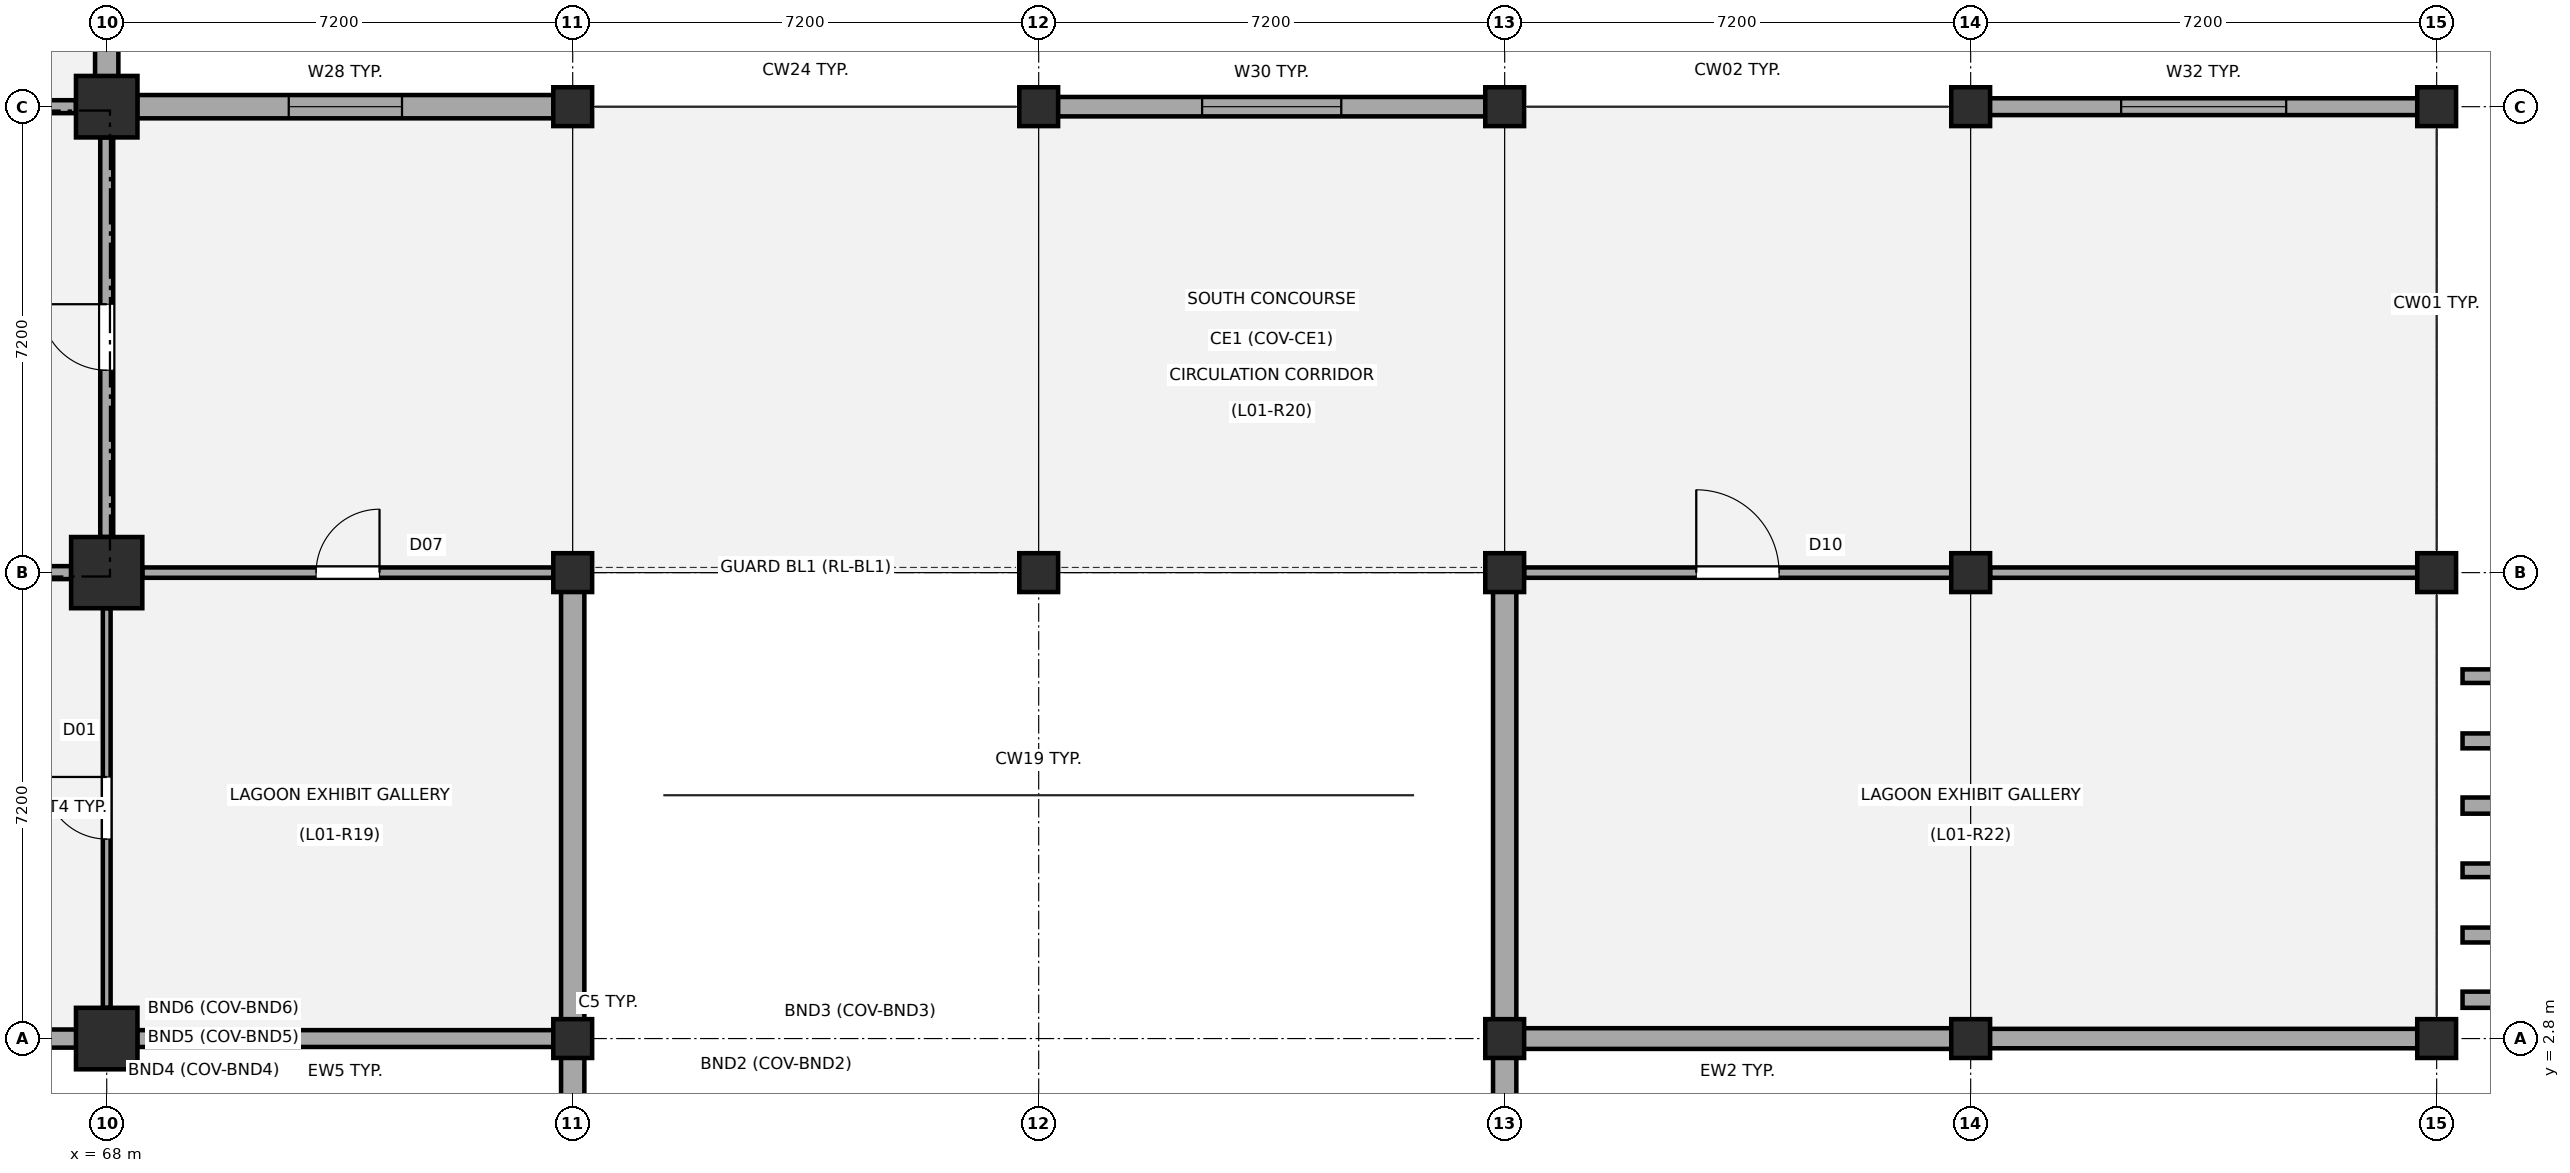
"""IFC4 building model, lengths in metres.
Left out: names, types, materials, properties, quantities, classifications, styles, units other than length and angle.
Written with IfcOpenShell. Run it as: python <this file> out.ifc"""

import sys

from ifc_helpers import new_model, si_unit, direction, frame, frame_2d, origin, origin_2d, place, context, subcontext, project, spatial, polyline, rectangle, outline, extrude, element, fill, save


model = new_model("IFC4")
c1 = context("Model", 3, precision=1e-05, world=origin(), true_north=direction((0.0, 1.0)))
c2 = subcontext(c1, "Body", "Model", "MODEL_VIEW")
j1 = project(units=[si_unit("LENGTHUNIT", "METRE"), si_unit("PLANEANGLEUNIT", "RADIAN")], contexts=[c1])
p1 = place(None, origin())
s1 = spatial("IfcSite", under=j1, at=p1, CompositionType="ELEMENT")
p2 = place(p1, origin())
s2 = spatial("IfcBuilding", under=s1, at=p2, CompositionType="ELEMENT")
p3 = place(p2, frame((0.0, 0.0, 4.68)))
s3 = spatial("IfcBuildingStorey", under=s2, at=p3, CompositionType="ELEMENT", Elevation=4.68)
p4 = place(p3, frame((68.0, 2.8, 0.0), z_axis=(0.0, 0.0, 1.0), x_axis=(1.0, 0.0, 0.0)))
e1 = element("IfcColumn", 1, at=p4, inside=s3, PredefinedType="COLUMN", context=c2, shape_type="SweptSolid", body=[
    extrude(rectangle(XDim=0.95, YDim=0.95, at=origin_2d()), origin(), (0.0, 0.0, 1.0), 4.5),
])
p5 = place(p3, frame((68.0, 10.0, 0.0), z_axis=(0.0, 0.0, 1.0), x_axis=(1.0, 0.0, 0.0)))
e2 = element("IfcColumn", 2, at=p5, inside=s3, PredefinedType="COLUMN", context=c2, shape_type="SweptSolid", body=[
    extrude(rectangle(XDim=1.1, YDim=1.1, at=origin_2d()), origin(), (0.0, 0.0, 1.0), 4.5),
])
p6 = place(p3, frame((68.0, 17.2, 0.0), z_axis=(0.0, 0.0, 1.0), x_axis=(1.0, 0.0, 0.0)))
e3 = element("IfcColumn", 3, at=p6, inside=s3, PredefinedType="COLUMN", context=c2, shape_type="SweptSolid", body=[
    extrude(rectangle(XDim=0.95, YDim=0.95, at=origin_2d()), origin(), (0.0, 0.0, 1.0), 4.5),
])
for number, where, z_axis, x_axis in (
    (4, (75.2, 2.8, 0.0), (0.0, 0.0, 1.0), (1.0, 0.0, 0.0)),
    (5, (75.2, 10.0, 0.0), (0.0, 0.0, 1.0), (1.0, 0.0, 0.0)),
    (6, (75.2, 17.2, 0.0), (0.0, 0.0, 1.0), (1.0, 0.0, 0.0)),
    (7, (82.4, 10.0, 0.0), (0.0, 0.0, 1.0), (1.0, 0.0, 0.0)),
    (8, (82.4, 17.2, 0.0), (0.0, 0.0, 1.0), (1.0, 0.0, 0.0)),
    (9, (89.6, 2.8, 0.0), (0.0, 0.0, 1.0), (1.0, 0.0, 0.0)),
    (10, (89.6, 10.0, 0.0), (0.0, 0.0, 1.0), (1.0, 0.0, 0.0)),
    (11, (89.6, 17.2, 0.0), (0.0, 0.0, 1.0), (1.0, 0.0, 0.0)),
    (12, (96.8, 2.8, 0.0), (0.0, 0.0, 1.0), (1.0, 0.0, 0.0)),
    (13, (96.8, 10.0, 0.0), (0.0, 0.0, 1.0), (1.0, 0.0, 0.0)),
    (14, (96.8, 17.2, 0.0), (0.0, 0.0, 1.0), (1.0, 0.0, 0.0)),
    (15, (104.0, 2.8, 0.0), (0.0, 0.0, 1.0), (1.0, 0.0, 0.0)),
    (16, (104.0, 10.0, 0.0), (0.0, 0.0, 1.0), (1.0, 0.0, 0.0)),
    (17, (104.0, 17.2, 0.0), (0.0, 0.0, 1.0), (1.0, 0.0, 0.0)),
):
    element("IfcColumn", number, at=place(p3, frame(where, z_axis=z_axis, x_axis=x_axis)), inside=s3, PredefinedType="COLUMN", context=c2, shape_type="SweptSolid", body=[
        extrude(rectangle(XDim=0.6, YDim=0.6, at=origin_2d()), origin(), (0.0, 0.0, 1.0), 4.5),
    ])
p7 = place(p3, frame((67.53, 2.8, 0.0), z_axis=(0.0, 0.0, 1.0), x_axis=(-1.0, 0.0, 0.0)))
e18 = element("IfcWall", 18, at=p7, inside=s3, PredefinedType="STANDARD", context=c2, shape_type="SweptSolid", body=[
    extrude(rectangle(XDim=6.185, YDim=0.28, at=frame_2d((3.093, 0.0))), origin(), (0.0, 0.0, 1.0), 3.49),
])
p8 = place(p3, frame((74.905, 2.8, 0.0), z_axis=(0.0, 0.0, 1.0), x_axis=(-1.0, 0.0, 0.0)))
e19 = element("IfcWall", 19, at=p8, inside=s3, PredefinedType="STANDARD", context=c2, shape_type="SweptSolid", body=[
    extrude(rectangle(XDim=6.435, YDim=0.26, at=frame_2d((3.218, 0.0))), origin(), (0.0, 0.0, 1.0), 3.51),
])
p9 = place(p3, frame((68.47, 17.2, 0.0), z_axis=(0.0, 0.0, 1.0), x_axis=(1.0, 0.0, 0.0)))
e20 = element("IfcWall", 20, at=p9, inside=s3, PredefinedType="STANDARD", context=c2, shape_type="SweptSolid", body=[
    extrude(rectangle(XDim=6.435, YDim=0.36, at=frame_2d((3.218, 0.0))), origin(), (0.0, 0.0, 1.0), 3.49),
])
p10 = place(p9, frame((2.343, 0.0, 0.95)))
e21 = element("IfcOpeningElement", 21, at=p10, cuts=e20, PredefinedType="OPENING", context=c2, shape_type="SweptSolid", body=[
    extrude(rectangle(XDim=1.75, YDim=1.3, at=frame_2d((0.875, 0.65))), frame((0.0, 0.19, 0.0), z_axis=(0.0, -1.0, 0.0), x_axis=(1.0, 0.0, 0.0)), (0.0, 0.0, 1.0), 0.38),
])
p11 = place(p3, frame((82.695, 17.2, 0.0), z_axis=(0.0, 0.0, 1.0), x_axis=(1.0, 0.0, 0.0)))
e22 = element("IfcWall", 22, at=p11, inside=s3, PredefinedType="STANDARD", context=c2, shape_type="SweptSolid", body=[
    extrude(rectangle(XDim=6.61, YDim=0.3, at=frame_2d((3.305, 0.0))), origin(), (0.0, 0.0, 1.0), 3.49),
])
p12 = place(p11, frame((2.23, 0.0, 0.95)))
e23 = element("IfcOpeningElement", 23, at=p12, cuts=e22, PredefinedType="OPENING", context=c2, shape_type="SweptSolid", body=[
    extrude(rectangle(XDim=2.15, YDim=1.4, at=frame_2d((1.075, 0.7))), frame((0.0, 0.16, 0.0), z_axis=(0.0, -1.0, 0.0), x_axis=(1.0, 0.0, 0.0)), (0.0, 0.0, 1.0), 0.32),
])
p13 = place(p3, frame((96.505, 2.8, 0.0), z_axis=(0.0, 0.0, 1.0), x_axis=(-1.0, 0.0, 0.0)))
e24 = element("IfcWall", 24, at=p13, inside=s3, PredefinedType="STANDARD", context=c2, shape_type="SweptSolid", body=[
    extrude(rectangle(XDim=6.61, YDim=0.32, at=frame_2d((3.305, 0.0))), origin(), (0.0, 0.0, 1.0), 3.49),
])
p14 = place(p3, frame((103.705, 2.8, 0.0), z_axis=(0.0, 0.0, 1.0), x_axis=(-1.0, 0.0, 0.0)))
e25 = element("IfcWall", 25, at=p14, inside=s3, PredefinedType="STANDARD", context=c2, shape_type="SweptSolid", body=[
    extrude(rectangle(XDim=6.61, YDim=0.3, at=frame_2d((3.305, 0.0))), origin(), (0.0, 0.0, 1.0), 3.51),
])
p15 = place(p3, frame((97.095, 17.2, 0.0), z_axis=(0.0, 0.0, 1.0), x_axis=(1.0, 0.0, 0.0)))
e26 = element("IfcWall", 26, at=p15, inside=s3, PredefinedType="STANDARD", context=c2, shape_type="SweptSolid", body=[
    extrude(rectangle(XDim=6.61, YDim=0.26, at=frame_2d((3.305, 0.0))), origin(), (0.0, 0.0, 1.0), 3.49),
])
p16 = place(p15, frame((2.03, 0.0, 0.95)))
e27 = element("IfcOpeningElement", 27, at=p16, cuts=e26, PredefinedType="OPENING", context=c2, shape_type="SweptSolid", body=[
    extrude(rectangle(XDim=2.55, YDim=1.35, at=frame_2d((1.275, 0.675))), frame((0.0, 0.14, 0.0), z_axis=(0.0, -1.0, 0.0), x_axis=(1.0, 0.0, 0.0)), (0.0, 0.0, 1.0), 0.28),
])
p17 = place(p3, frame((68.0, 23.855, 0.0), z_axis=(0.0, 0.0, 1.0), x_axis=(0.0, -1.0, 0.0)))
e28 = element("IfcWall", 28, at=p17, inside=s3, PredefinedType="STANDARD", context=c2, shape_type="SweptSolid", body=[
    extrude(rectangle(XDim=6.185, YDim=0.36, at=frame_2d((3.093, 0.0))), origin(), (0.0, 0.0, 1.0), 3.49),
])
for number, where, z_axis, x_axis in (
    (29, (75.2, 1.56, 0.0), (0.0, 0.0, 1.0), (0.0, 1.0, 0.0)),
    (30, (89.6, 1.56, 0.0), (0.0, 0.0, 1.0), (0.0, 1.0, 0.0)),
):
    element("IfcWall", number, at=place(p3, frame(where, z_axis=z_axis, x_axis=x_axis)), inside=s3, PredefinedType="STANDARD", context=c2, shape_type="SweptSolid", body=[
        extrude(rectangle(XDim=8.145, YDim=0.36, at=frame_2d((4.073, 0.0))), origin(), (0.0, 0.0, 1.0), 3.49),
    ])
p18 = place(p2, origin())
s4 = spatial("IfcBuildingStorey", under=s2, at=p18, CompositionType="ELEMENT", Elevation=0.0)
for number, where, z_axis, x_axis in (
    (31, (75.2, 6.56, 0.0), (0.0, 0.0, 1.0), (1.0, 0.0, 0.0)),
    (32, (88.2, 6.56, 0.0), (0.0, 0.0, 1.0), (1.0, 0.0, 0.0)),
):
    element("IfcWall", number, at=place(p18, frame(where, z_axis=z_axis, x_axis=x_axis)), inside=s4, PredefinedType="STANDARD", context=c2, shape_type="SweptSolid", body=[
        extrude(rectangle(XDim=1.4, YDim=0.34, at=frame_2d((0.7, 0.0))), origin(), (0.0, 0.0, 1.0), 8.87),
    ])
p19 = place(p3, frame((104.4, 3.4, -0.3), z_axis=(0.0, 0.0, 1.0), x_axis=(1.0, 0.0, 0.0)))
e33 = element("IfcWall", 33, at=p19, inside=s3, PredefinedType="PARAPET", context=c2, shape_type="SweptSolid", body=[
    extrude(outline(polyline([(0.0, 0.0), (13.6, 0.0), (13.6, 2.5), (10.2, 3.0), (6.8, 3.2), (3.4, 3.0), (0.0, 2.5), (0.0, 0.0)])), frame((0.0, 0.125, 0.0), z_axis=(0.0, -1.0, 0.0), x_axis=(1.0, 0.0, 0.0)), (0.0, 0.0, 1.0), 0.25),
])
p20 = place(p3, frame((104.4, 4.4, -0.3), z_axis=(0.0, 0.0, 1.0), x_axis=(1.0, 0.0, 0.0)))
e34 = element("IfcWall", 34, at=p20, inside=s3, PredefinedType="PARAPET", context=c2, shape_type="SweptSolid", body=[
    extrude(outline(polyline([(0.0, 0.0), (13.6, 0.0), (13.6, 2.26), (10.2, 2.76), (6.8, 2.96), (3.4, 2.76), (0.0, 2.26), (0.0, 0.0)])), frame((0.0, 0.115, 0.0), z_axis=(0.0, -1.0, 0.0), x_axis=(1.0, 0.0, 0.0)), (0.0, 0.0, 1.0), 0.23),
])
p21 = place(p3, frame((104.4, 5.4, -0.3), z_axis=(0.0, 0.0, 1.0), x_axis=(1.0, 0.0, 0.0)))
e35 = element("IfcWall", 35, at=p21, inside=s3, PredefinedType="PARAPET", context=c2, shape_type="SweptSolid", body=[
    extrude(outline(polyline([(0.0, 0.0), (13.6, 0.0), (13.6, 2.02), (10.2, 2.52), (6.8, 2.72), (3.4, 2.52), (0.0, 2.02), (0.0, 0.0)])), frame((0.0, 0.105, 0.0), z_axis=(0.0, -1.0, 0.0), x_axis=(1.0, 0.0, 0.0)), (0.0, 0.0, 1.0), 0.21),
])
p22 = place(p3, frame((104.4, 6.4, -0.3), z_axis=(0.0, 0.0, 1.0), x_axis=(1.0, 0.0, 0.0)))
e36 = element("IfcWall", 36, at=p22, inside=s3, PredefinedType="PARAPET", context=c2, shape_type="SweptSolid", body=[
    extrude(outline(polyline([(0.0, 0.0), (13.6, 0.0), (13.6, 1.78), (10.2, 2.28), (6.8, 2.48), (3.4, 2.28), (0.0, 1.78), (0.0, 0.0)])), frame((0.0, 0.125, 0.0), z_axis=(0.0, -1.0, 0.0), x_axis=(1.0, 0.0, 0.0)), (0.0, 0.0, 1.0), 0.25),
])
p23 = place(p3, frame((104.4, 7.4, -0.3), z_axis=(0.0, 0.0, 1.0), x_axis=(1.0, 0.0, 0.0)))
e37 = element("IfcWall", 37, at=p23, inside=s3, PredefinedType="PARAPET", context=c2, shape_type="SweptSolid", body=[
    extrude(outline(polyline([(0.0, 0.0), (13.6, 0.0), (13.6, 1.54), (10.2, 2.04), (6.8, 2.24), (3.4, 2.04), (0.0, 1.54), (0.0, 0.0)])), frame((0.0, 0.115, 0.0), z_axis=(0.0, -1.0, 0.0), x_axis=(1.0, 0.0, 0.0)), (0.0, 0.0, 1.0), 0.23),
])
p24 = place(p3, frame((104.4, 8.4, -0.3), z_axis=(0.0, 0.0, 1.0), x_axis=(1.0, 0.0, 0.0)))
e38 = element("IfcWall", 38, at=p24, inside=s3, PredefinedType="PARAPET", context=c2, shape_type="SweptSolid", body=[
    extrude(outline(polyline([(0.0, 0.0), (13.6, 0.0), (13.6, 1.3), (10.2, 1.8), (6.8, 2.0), (3.4, 1.8), (0.0, 1.3), (0.0, 0.0)])), frame((0.0, 0.105, 0.0), z_axis=(0.0, -1.0, 0.0), x_axis=(1.0, 0.0, 0.0)), (0.0, 0.0, 1.0), 0.21),
])
p25 = place(p3, frame((68.0, 10.55, 0.0), z_axis=(0.0, 0.0, 1.0), x_axis=(0.0, 1.0, 0.0)))
e39 = element("IfcWall", 39, at=p25, inside=s3, PredefinedType="PARTITIONING", context=c2, shape_type="SweptSolid", body=[
    extrude(rectangle(XDim=6.175, YDim=0.2, at=frame_2d((3.087, 0.0))), origin(), (0.0, 0.0, 1.0), 3.59),
])
p26 = place(p25, frame((2.577, 0.0, 0.0)))
e40 = element("IfcOpeningElement", 40, at=p26, cuts=e39, PredefinedType="OPENING", context=c2, shape_type="SweptSolid", body=[
    extrude(rectangle(XDim=1.02, YDim=2.15, at=frame_2d((0.51, 1.075))), frame((0.0, 0.11, 0.0), z_axis=(0.0, -1.0, 0.0), x_axis=(1.0, 0.0, 0.0)), (0.0, 0.0, 1.0), 0.22),
])
p27 = place(p3, frame((65.34, 10.0, 0.0), z_axis=(0.0, 0.0, 1.0), x_axis=(1.0, 0.0, 0.0)))
e41 = element("IfcWall", 41, at=p27, inside=s3, PredefinedType="PARTITIONING", context=c2, shape_type="SweptSolid", body=[
    extrude(rectangle(XDim=2.11, YDim=0.2, at=frame_2d((1.055, 0.0))), origin(), (0.0, 0.0, 1.0), 3.59),
])
p28 = place(p3, frame((65.34, 17.2, 0.0), z_axis=(0.0, 0.0, 1.0), x_axis=(1.0, 0.0, 0.0)))
e42 = element("IfcWall", 42, at=p28, inside=s3, PredefinedType="PARTITIONING", context=c2, shape_type="SweptSolid", body=[
    extrude(rectangle(XDim=2.185, YDim=0.2, at=frame_2d((1.092, 0.0))), origin(), (0.0, 0.0, 1.0), 3.54),
])
p29 = place(p3, frame((68.0, 3.275, 0.0), z_axis=(0.0, 0.0, 1.0), x_axis=(0.0, 1.0, 0.0)))
e43 = element("IfcWall", 43, at=p29, inside=s3, PredefinedType="PARTITIONING", context=c2, shape_type="SweptSolid", body=[
    extrude(rectangle(XDim=6.175, YDim=0.12, at=frame_2d((3.087, 0.0))), origin(), (0.0, 0.0, 1.0), 3.54),
])
p30 = place(p29, frame((2.607, 0.0, 0.0)))
e44 = element("IfcOpeningElement", 44, at=p30, cuts=e43, PredefinedType="OPENING", context=c2, shape_type="SweptSolid", body=[
    extrude(rectangle(XDim=0.96, YDim=2.1, at=frame_2d((0.48, 1.05))), frame((0.0, 0.07, 0.0), z_axis=(0.0, -1.0, 0.0), x_axis=(1.0, 0.0, 0.0)), (0.0, 0.0, 1.0), 0.14),
])
p31 = place(p3, frame((68.55, 10.0, 0.0), z_axis=(0.0, 0.0, 1.0), x_axis=(1.0, 0.0, 0.0)))
e45 = element("IfcWall", 45, at=p31, inside=s3, PredefinedType="PARTITIONING", context=c2, shape_type="SweptSolid", body=[
    extrude(rectangle(XDim=6.35, YDim=0.16, at=frame_2d((3.175, 0.0))), origin(), (0.0, 0.0, 1.0), 3.54),
])
p32 = place(p31, frame((2.685, 0.0, 0.0)))
e46 = element("IfcOpeningElement", 46, at=p32, cuts=e45, PredefinedType="OPENING", context=c2, shape_type="SweptSolid", body=[
    extrude(rectangle(XDim=0.98, YDim=2.12, at=frame_2d((0.49, 1.06))), frame((0.0, 0.09, 0.0), z_axis=(0.0, -1.0, 0.0), x_axis=(1.0, 0.0, 0.0)), (0.0, 0.0, 1.0), 0.18),
])
p33 = place(p3, frame((89.9, 10.0, 0.0), z_axis=(0.0, 0.0, 1.0), x_axis=(1.0, 0.0, 0.0)))
e47 = element("IfcWall", 47, at=p33, inside=s3, PredefinedType="PARTITIONING", context=c2, shape_type="SweptSolid", body=[
    extrude(rectangle(XDim=6.6, YDim=0.16, at=frame_2d((3.3, 0.0))), origin(), (0.0, 0.0, 1.0), 3.59),
])
p34 = place(p33, frame((2.66, 0.0, 0.0)))
e48 = element("IfcOpeningElement", 48, at=p34, cuts=e47, PredefinedType="OPENING", context=c2, shape_type="SweptSolid", body=[
    extrude(rectangle(XDim=1.28, YDim=2.2, at=frame_2d((0.64, 1.1))), frame((0.0, 0.09, 0.0), z_axis=(0.0, -1.0, 0.0), x_axis=(1.0, 0.0, 0.0)), (0.0, 0.0, 1.0), 0.18),
])
p35 = place(p3, frame((97.1, 10.0, 0.0), z_axis=(0.0, 0.0, 1.0), x_axis=(1.0, 0.0, 0.0)))
e49 = element("IfcWall", 49, at=p35, inside=s3, PredefinedType="PARTITIONING", context=c2, shape_type="SweptSolid", body=[
    extrude(rectangle(XDim=6.6, YDim=0.16, at=frame_2d((3.3, 0.0))), origin(), (0.0, 0.0, 1.0), 3.54),
])
p36 = place(p10, origin())
e50 = element("IfcWindow", 50, at=p36, inside=s3, PartitioningType="SINGLE_PANEL", PredefinedType="WINDOW", context=c2, shape_type="SweptSolid", body=[
    extrude(rectangle(XDim=1.75, YDim=1.3, at=frame_2d((0.875, 0.65))), frame((0.0, 0.03, 0.0), z_axis=(0.0, -1.0, 0.0), x_axis=(1.0, 0.0, 0.0)), (0.0, 0.0, 1.0), 0.06),
])
fill(e21, e50)
p37 = place(p12, origin())
e51 = element("IfcWindow", 51, at=p37, inside=s3, PartitioningType="SINGLE_PANEL", PredefinedType="WINDOW", context=c2, shape_type="SweptSolid", body=[
    extrude(rectangle(XDim=2.15, YDim=1.4, at=frame_2d((1.075, 0.7))), frame((0.0, 0.03, 0.0), z_axis=(0.0, -1.0, 0.0), x_axis=(1.0, 0.0, 0.0)), (0.0, 0.0, 1.0), 0.06),
])
fill(e23, e51)
p38 = place(p16, origin())
e52 = element("IfcWindow", 52, at=p38, inside=s3, PartitioningType="SINGLE_PANEL", PredefinedType="WINDOW", context=c2, shape_type="SweptSolid", body=[
    extrude(rectangle(XDim=2.55, YDim=1.35, at=frame_2d((1.275, 0.675))), frame((0.0, 0.03, 0.0), z_axis=(0.0, -1.0, 0.0), x_axis=(1.0, 0.0, 0.0)), (0.0, 0.0, 1.0), 0.06),
])
fill(e27, e52)
p39 = place(p26, origin())
e53 = element("IfcDoor", 53, at=p39, inside=s3, OperationType="SINGLE_SWING_RIGHT", PredefinedType="DOOR", context=c2, shape_type="SweptSolid", body=[
    extrude(rectangle(XDim=1.02, YDim=2.15, at=frame_2d((0.51, 1.075))), frame((0.0, 0.025, 0.0), z_axis=(0.0, -1.0, 0.0), x_axis=(1.0, 0.0, 0.0)), (0.0, 0.0, 1.0), 0.05),
])
fill(e40, e53)
p40 = place(p30, origin())
e54 = element("IfcDoor", 54, at=p40, inside=s3, OperationType="SINGLE_SWING_RIGHT", PredefinedType="DOOR", context=c2, shape_type="SweptSolid", body=[
    extrude(rectangle(XDim=0.96, YDim=2.1, at=frame_2d((0.48, 1.05))), frame((0.0, 0.025, 0.0), z_axis=(0.0, -1.0, 0.0), x_axis=(1.0, 0.0, 0.0)), (0.0, 0.0, 1.0), 0.05),
])
fill(e44, e54)
p41 = place(p32, origin())
e55 = element("IfcDoor", 55, at=p41, inside=s3, OperationType="SINGLE_SWING_RIGHT", PredefinedType="DOOR", context=c2, shape_type="SweptSolid", body=[
    extrude(rectangle(XDim=0.98, YDim=2.12, at=frame_2d((0.49, 1.06))), frame((0.0, 0.025, 0.0), z_axis=(0.0, -1.0, 0.0), x_axis=(1.0, 0.0, 0.0)), (0.0, 0.0, 1.0), 0.05),
])
fill(e46, e55)
p42 = place(p34, origin())
e56 = element("IfcDoor", 56, at=p42, inside=s3, OperationType="SINGLE_SWING_LEFT", PredefinedType="DOOR", context=c2, shape_type="SweptSolid", body=[
    extrude(rectangle(XDim=1.28, YDim=2.2, at=frame_2d((0.64, 1.1))), frame((0.0, 0.025, 0.0), z_axis=(0.0, -1.0, 0.0), x_axis=(1.0, 0.0, 0.0)), (0.0, 0.0, 1.0), 0.05),
])
fill(e48, e56)
save(model, sys.argv[1])
